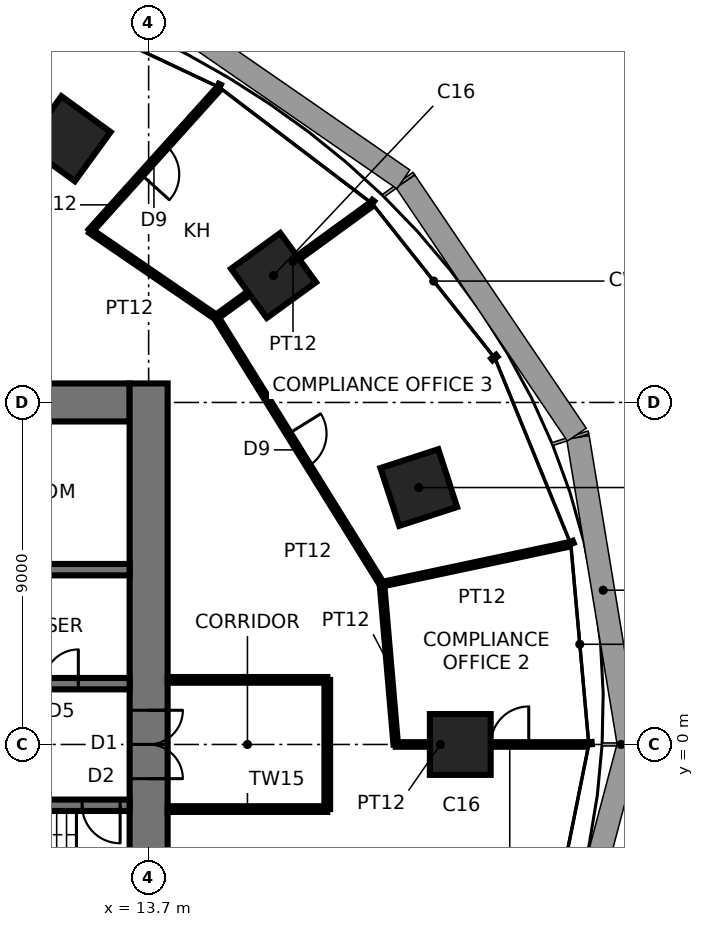
"""IFC4 building model, lengths in metres.
Left out: names, types, materials, properties, quantities, classifications, styles, units other than length and angle.
Written with IfcOpenShell. Run it as: python <this file> out.ifc"""

import sys

from ifc_helpers import new_model, si_unit, direction, frame, frame_2d, origin, origin_2d, place, context, subcontext, project, spatial, rectangle, extrude, element, fill, save


model = new_model("IFC4")
c1 = context("Model", 3, precision=1e-05, world=origin(), true_north=direction((0.0, 1.0)))
c2 = subcontext(c1, "Body", "Model", "MODEL_VIEW")
j1 = project(units=[si_unit("LENGTHUNIT", "METRE"), si_unit("PLANEANGLEUNIT", "RADIAN")], contexts=[c1])
p1 = place(None, origin())
s1 = spatial("IfcSite", under=j1, at=p1, CompositionType="ELEMENT")
p2 = place(p1, origin())
s2 = spatial("IfcBuilding", under=s1, at=p2, CompositionType="ELEMENT")
p3 = place(p2, frame((0.0, 0.0, 96.3)))
s3 = spatial("IfcBuildingStorey", under=s2, at=p3, CompositionType="ELEMENT", Elevation=96.3)
for number, where, z_axis, x_axis in (
    (1, (21.9, 0.0, 0.0), (0.0, 0.0, 1.0), (1.0, 0.0, 0.0)),
    (2, (20.808, 6.761, 0.0), (0.0, 0.0, 1.0), (0.951, 0.309, 0.0)),
    (3, (16.986, 12.341, 0.0), (0.0, 0.0, 1.0), (0.809, 0.588, 0.0)),
    (4, (11.581, 15.94, 0.0), (0.0, 0.0, 1.0), (0.588, 0.809, 0.0)),
):
    element("IfcColumn", number, at=place(p3, frame(where, z_axis=z_axis, x_axis=x_axis)), inside=s3, PredefinedType="COLUMN", context=c2, shape_type="SweptSolid", body=[
        extrude(rectangle(XDim=1.6, YDim=1.6, at=origin_2d()), origin(), (0.0, 0.0, 1.0), 3.9),
    ])
p4 = place(p3, frame((13.2, 9.0, 0.0), z_axis=(0.0, 0.0, 1.0), x_axis=(-1.0, 0.0, 0.0)))
e5 = element("IfcWall", 5, at=p4, inside=s3, PredefinedType="SHEAR", context=c2, shape_type="SweptSolid", body=[
    extrude(rectangle(XDim=26.4, YDim=1.0, at=frame_2d((13.2, 0.0))), origin(), (0.0, 0.0, 1.0), 3.9),
])
p5 = place(p4, frame((2.65, 0.0, 0.0)))
e6 = element("IfcOpeningElement", 6, at=p5, cuts=e5, PredefinedType="OPENING", context=c2, shape_type="SweptSolid", body=[
    extrude(rectangle(XDim=0.9, YDim=2.1, at=frame_2d((0.45, 1.05))), frame((0.0, 0.51, 0.0), z_axis=(0.0, -1.0, 0.0), x_axis=(1.0, 0.0, 0.0)), (0.0, 0.0, 1.0), 1.02),
])
p6 = place(p4, frame((9.5, 0.0, 0.0)))
e7 = element("IfcOpeningElement", 7, at=p6, cuts=e5, PredefinedType="OPENING", context=c2, shape_type="SweptSolid", body=[
    extrude(rectangle(XDim=0.9, YDim=2.1, at=frame_2d((0.45, 1.05))), frame((0.0, 0.51, 0.0), z_axis=(0.0, -1.0, 0.0), x_axis=(1.0, 0.0, 0.0)), (0.0, 0.0, 1.0), 1.02),
])
p7 = place(p4, frame((16.0, 0.0, 0.0)))
e8 = element("IfcOpeningElement", 8, at=p7, cuts=e5, PredefinedType="OPENING", context=c2, shape_type="SweptSolid", body=[
    extrude(rectangle(XDim=0.9, YDim=2.1, at=frame_2d((0.45, 1.05))), frame((0.0, 0.51, 0.0), z_axis=(0.0, -1.0, 0.0), x_axis=(1.0, 0.0, 0.0)), (0.0, 0.0, 1.0), 1.02),
])
p8 = place(p4, frame((21.25, 0.0, 0.0)))
e9 = element("IfcOpeningElement", 9, at=p8, cuts=e5, PredefinedType="OPENING", context=c2, shape_type="SweptSolid", body=[
    extrude(rectangle(XDim=0.9, YDim=2.1, at=frame_2d((0.45, 1.05))), frame((0.0, 0.51, 0.0), z_axis=(0.0, -1.0, 0.0), x_axis=(1.0, 0.0, 0.0)), (0.0, 0.0, 1.0), 1.02),
])
p9 = place(p4, frame((24.8, 0.0, 0.0)))
e10 = element("IfcOpeningElement", 10, at=p9, cuts=e5, PredefinedType="OPENING", context=c2, shape_type="SweptSolid", body=[
    extrude(rectangle(XDim=1.0, YDim=2.1, at=frame_2d((0.5, 1.05))), frame((0.0, 0.51, 0.0), z_axis=(0.0, -1.0, 0.0), x_axis=(1.0, 0.0, 0.0)), (0.0, 0.0, 1.0), 1.02),
])
p10 = place(p3, frame((13.7, -9.5, 0.0), z_axis=(0.0, 0.0, 1.0), x_axis=(0.0, 1.0, 0.0)))
e11 = element("IfcWall", 11, at=p10, inside=s3, PredefinedType="SHEAR", context=c2, shape_type="SweptSolid", body=[
    extrude(rectangle(XDim=19.0, YDim=1.0, at=frame_2d((9.5, 0.0))), origin(), (0.0, 0.0, 1.0), 3.9),
])
p11 = place(p10, frame((8.6, 0.0, 0.0)))
e12 = element("IfcOpeningElement", 12, at=p11, cuts=e11, PredefinedType="OPENING", context=c2, shape_type="SweptSolid", body=[
    extrude(rectangle(XDim=1.8, YDim=2.4, at=frame_2d((0.9, 1.2))), frame((0.0, 0.51, 0.0), z_axis=(0.0, -1.0, 0.0), x_axis=(1.0, 0.0, 0.0)), (0.0, 0.0, 1.0), 1.02),
])
p12 = place(p3, frame((-13.2, 1.6, 0.0), z_axis=(0.0, 0.0, 1.0), x_axis=(1.0, 0.0, 0.0)))
e13 = element("IfcWall", 13, at=p12, inside=s3, PredefinedType="SHEAR", context=c2, shape_type="SweptSolid", body=[
    extrude(rectangle(XDim=26.4, YDim=0.3, at=frame_2d((13.2, 0.0))), origin(), (0.0, 0.0, 1.0), 3.9),
])
p13 = place(p12, frame((0.25, 0.0, 0.0)))
e14 = element("IfcOpeningElement", 14, at=p13, cuts=e13, PredefinedType="OPENING", context=c2, shape_type="SweptSolid", body=[
    extrude(rectangle(XDim=1.0, YDim=2.1, at=frame_2d((0.5, 1.05))), frame((0.0, 0.16, 0.0), z_axis=(0.0, -1.0, 0.0), x_axis=(1.0, 0.0, 0.0)), (0.0, 0.0, 1.0), 0.32),
])
p14 = place(p12, frame((20.25, 0.0, 0.0)))
e15 = element("IfcOpeningElement", 15, at=p14, cuts=e13, PredefinedType="OPENING", context=c2, shape_type="SweptSolid", body=[
    extrude(rectangle(XDim=1.5, YDim=2.4, at=frame_2d((0.75, 1.2))), frame((0.0, 0.16, 0.0), z_axis=(0.0, -1.0, 0.0), x_axis=(1.0, 0.0, 0.0)), (0.0, 0.0, 1.0), 0.32),
])
p15 = place(p12, frame((7.55, 0.0, 0.0)))
e16 = element("IfcOpeningElement", 16, at=p15, cuts=e13, PredefinedType="OPENING", context=c2, shape_type="SweptSolid", body=[
    extrude(rectangle(XDim=0.9, YDim=2.1, at=frame_2d((0.45, 1.05))), frame((0.0, 0.16, 0.0), z_axis=(0.0, -1.0, 0.0), x_axis=(1.0, 0.0, 0.0)), (0.0, 0.0, 1.0), 0.32),
])
p16 = place(p12, frame((10.15, 0.0, 0.0)))
e17 = element("IfcOpeningElement", 17, at=p16, cuts=e13, PredefinedType="OPENING", context=c2, shape_type="SweptSolid", body=[
    extrude(rectangle(XDim=0.9, YDim=2.1, at=frame_2d((0.45, 1.05))), frame((0.0, 0.16, 0.0), z_axis=(0.0, -1.0, 0.0), x_axis=(1.0, 0.0, 0.0)), (0.0, 0.0, 1.0), 0.32),
])
p17 = place(p12, frame((12.75, 0.0, 0.0)))
e18 = element("IfcOpeningElement", 18, at=p17, cuts=e13, PredefinedType="OPENING", context=c2, shape_type="SweptSolid", body=[
    extrude(rectangle(XDim=0.9, YDim=2.1, at=frame_2d((0.45, 1.05))), frame((0.0, 0.16, 0.0), z_axis=(0.0, -1.0, 0.0), x_axis=(1.0, 0.0, 0.0)), (0.0, 0.0, 1.0), 0.32),
])
p18 = place(p12, frame((24.15, 0.0, 0.0)))
e19 = element("IfcOpeningElement", 19, at=p18, cuts=e13, PredefinedType="OPENING", context=c2, shape_type="SweptSolid", body=[
    extrude(rectangle(XDim=0.9, YDim=2.1, at=frame_2d((0.45, 1.05))), frame((0.0, 0.16, 0.0), z_axis=(0.0, -1.0, 0.0), x_axis=(1.0, 0.0, 0.0)), (0.0, 0.0, 1.0), 0.32),
])
p19 = place(p3, frame((-13.2, -1.6, 0.0), z_axis=(0.0, 0.0, 1.0), x_axis=(1.0, 0.0, 0.0)))
e20 = element("IfcWall", 20, at=p19, inside=s3, PredefinedType="SHEAR", context=c2, shape_type="SweptSolid", body=[
    extrude(rectangle(XDim=26.4, YDim=0.3, at=frame_2d((13.2, 0.0))), origin(), (0.0, 0.0, 1.0), 3.9),
])
p20 = place(p19, frame((25.15, 0.0, 0.0)))
e21 = element("IfcOpeningElement", 21, at=p20, cuts=e20, PredefinedType="OPENING", context=c2, shape_type="SweptSolid", body=[
    extrude(rectangle(XDim=1.0, YDim=2.1, at=frame_2d((0.5, 1.05))), frame((0.0, 0.16, 0.0), z_axis=(0.0, -1.0, 0.0), x_axis=(1.0, 0.0, 0.0)), (0.0, 0.0, 1.0), 0.32),
])
p21 = place(p19, frame((7.45, 0.0, 0.0)))
e22 = element("IfcOpeningElement", 22, at=p21, cuts=e20, PredefinedType="OPENING", context=c2, shape_type="SweptSolid", body=[
    extrude(rectangle(XDim=1.1, YDim=2.3, at=frame_2d((0.55, 1.15))), frame((0.0, 0.16, 0.0), z_axis=(0.0, -1.0, 0.0), x_axis=(1.0, 0.0, 0.0)), (0.0, 0.0, 1.0), 0.32),
])
p22 = place(p19, frame((10.05, 0.0, 0.0)))
e23 = element("IfcOpeningElement", 23, at=p22, cuts=e20, PredefinedType="OPENING", context=c2, shape_type="SweptSolid", body=[
    extrude(rectangle(XDim=1.1, YDim=2.3, at=frame_2d((0.55, 1.15))), frame((0.0, 0.16, 0.0), z_axis=(0.0, -1.0, 0.0), x_axis=(1.0, 0.0, 0.0)), (0.0, 0.0, 1.0), 0.32),
])
p23 = place(p19, frame((12.65, 0.0, 0.0)))
e24 = element("IfcOpeningElement", 24, at=p23, cuts=e20, PredefinedType="OPENING", context=c2, shape_type="SweptSolid", body=[
    extrude(rectangle(XDim=1.1, YDim=2.3, at=frame_2d((0.55, 1.15))), frame((0.0, 0.16, 0.0), z_axis=(0.0, -1.0, 0.0), x_axis=(1.0, 0.0, 0.0)), (0.0, 0.0, 1.0), 0.32),
])
p24 = place(p19, frame((15.25, 0.0, 0.0)))
e25 = element("IfcOpeningElement", 25, at=p24, cuts=e20, PredefinedType="OPENING", context=c2, shape_type="SweptSolid", body=[
    extrude(rectangle(XDim=1.1, YDim=2.3, at=frame_2d((0.55, 1.15))), frame((0.0, 0.16, 0.0), z_axis=(0.0, -1.0, 0.0), x_axis=(1.0, 0.0, 0.0)), (0.0, 0.0, 1.0), 0.32),
])
p25 = place(p19, frame((17.85, 0.0, 0.0)))
e26 = element("IfcOpeningElement", 26, at=p25, cuts=e20, PredefinedType="OPENING", context=c2, shape_type="SweptSolid", body=[
    extrude(rectangle(XDim=1.1, YDim=2.3, at=frame_2d((0.55, 1.15))), frame((0.0, 0.16, 0.0), z_axis=(0.0, -1.0, 0.0), x_axis=(1.0, 0.0, 0.0)), (0.0, 0.0, 1.0), 0.32),
])
p26 = place(p19, frame((5.55, 0.0, 0.0)))
e27 = element("IfcOpeningElement", 27, at=p26, cuts=e20, PredefinedType="OPENING", context=c2, shape_type="SweptSolid", body=[
    extrude(rectangle(XDim=0.9, YDim=2.1, at=frame_2d((0.45, 1.05))), frame((0.0, 0.16, 0.0), z_axis=(0.0, -1.0, 0.0), x_axis=(1.0, 0.0, 0.0)), (0.0, 0.0, 1.0), 0.32),
])
p27 = place(p3, frame((-13.2, 4.6, 0.0), z_axis=(0.0, 0.0, 1.0), x_axis=(1.0, 0.0, 0.0)))
e28 = element("IfcWall", 28, at=p27, inside=s3, PredefinedType="SHEAR", context=c2, shape_type="SweptSolid", body=[
    extrude(rectangle(XDim=26.4, YDim=0.3, at=frame_2d((13.2, 0.0))), origin(), (0.0, 0.0, 1.0), 3.9),
])
p28 = place(p3, frame((14.2, -1.7, 0.0), z_axis=(0.0, 0.0, 1.0), x_axis=(1.0, 0.0, 0.0)))
e29 = element("IfcWall", 29, at=p28, inside=s3, PredefinedType="PARTITIONING", context=c2, shape_type="SweptSolid", body=[
    extrude(rectangle(XDim=4.2, YDim=0.15, at=frame_2d((2.1, 0.0))), origin(), (0.0, 0.0, 1.0), 3.74),
])
p29 = place(p3, frame((18.4, -1.7, 0.0), z_axis=(0.0, 0.0, 1.0), x_axis=(0.0, 1.0, 0.0)))
e30 = element("IfcWall", 30, at=p29, inside=s3, PredefinedType="PARTITIONING", context=c2, shape_type="SweptSolid", body=[
    extrude(rectangle(XDim=3.4, YDim=0.15, at=frame_2d((1.7, 0.0))), origin(), (0.0, 0.0, 1.0), 3.74),
])
p30 = place(p3, frame((20.202, 0.0, 0.0), z_axis=(0.0, 0.0, 1.0), x_axis=(1.0, 0.0, 0.0)))
e31 = element("IfcWall", 31, at=p30, inside=s3, PredefinedType="PARTITIONING", context=c2, shape_type="SweptSolid", body=[
    extrude(rectangle(XDim=5.0, YDim=0.12, at=frame_2d((2.5, 0.0))), origin(), (0.0, 0.0, 1.0), 2.94),
])
p31 = place(p30, frame((2.5, 0.0, 0.0)))
e32 = element("IfcOpeningElement", 32, at=p31, cuts=e31, PredefinedType="OPENING", context=c2, shape_type="SweptSolid", body=[
    extrude(rectangle(XDim=1.0, YDim=2.4, at=frame_2d((0.5, 1.2))), frame((0.0, 0.07, 0.0), z_axis=(0.0, -1.0, 0.0), x_axis=(1.0, 0.0, 0.0)), (0.0, 0.0, 1.0), 0.14),
])
p32 = place(p3, frame((18.4, 1.7, 0.0), z_axis=(0.0, 0.0, 1.0), x_axis=(-1.0, 0.0, 0.0)))
e33 = element("IfcWall", 33, at=p32, inside=s3, PredefinedType="PARTITIONING", context=c2, shape_type="SweptSolid", body=[
    extrude(rectangle(XDim=4.2, YDim=0.15, at=frame_2d((2.1, 0.0))), origin(), (0.0, 0.0, 1.0), 3.74),
])
p33 = place(p3, frame((19.84, 4.217, 0.0), z_axis=(0.0, 0.0, 1.0), x_axis=(0.085599097882, -0.996329661529, 0.0)))
e34 = element("IfcWall", 34, at=p33, inside=s3, PredefinedType="PARTITIONING", context=c2, shape_type="SweptSolid", body=[
    extrude(rectangle(XDim=4.233, YDim=0.12, at=frame_2d((2.116, 0.0))), origin(), (0.0, 0.0, 1.0), 3.74),
])
p34 = place(p3, frame((19.84, 4.217, 0.0), z_axis=(0.0, 0.0, 1.0), x_axis=(0.978149046495, 0.207904888932, 0.0)))
e35 = element("IfcWall", 35, at=p34, inside=s3, PredefinedType="PARTITIONING", context=c2, shape_type="SweptSolid", body=[
    extrude(rectangle(XDim=5.0, YDim=0.12, at=frame_2d((2.5, 0.0))), origin(), (0.0, 0.0, 1.0), 3.74),
])
p35 = place(p3, frame((15.477, 11.244, 0.0), z_axis=(0.0, 0.0, 1.0), x_axis=(0.527470861315, -0.849573122494, 0.0)))
e36 = element("IfcWall", 36, at=p35, inside=s3, PredefinedType="PARTITIONING", context=c2, shape_type="SweptSolid", body=[
    extrude(rectangle(XDim=8.272, YDim=0.12, at=frame_2d((4.136, 0.0))), origin(), (0.0, 0.0, 1.0), 3.286),
])
p36 = place(p35, frame((3.611, 0.0, 0.0)))
e37 = element("IfcOpeningElement", 37, at=p36, cuts=e36, PredefinedType="OPENING", context=c2, shape_type="SweptSolid", body=[
    extrude(rectangle(XDim=1.0, YDim=2.4, at=frame_2d((0.5, 1.2))), frame((0.0, 0.07, 0.0), z_axis=(0.0, -1.0, 0.0), x_axis=(1.0, 0.0, 0.0)), (0.0, 0.0, 1.0), 0.14),
])
p37 = place(p3, frame((19.521, 14.183, 0.0), z_axis=(0.0, 0.0, 1.0), x_axis=(-0.809025274756, -0.587773855157, 0.0)))
e38 = element("IfcWall", 38, at=p37, inside=s3, PredefinedType="PARTITIONING", context=c2, shape_type="SweptSolid", body=[
    extrude(rectangle(XDim=5.0, YDim=0.12, at=frame_2d((2.5, 0.0))), origin(), (0.0, 0.0, 1.0), 2.94),
])
p38 = place(p3, frame((12.167, 13.512, 0.0), z_axis=(0.0, 0.0, 1.0), x_axis=(0.824905575903, -0.565270546591, 0.0)))
e39 = element("IfcWall", 39, at=p38, inside=s3, PredefinedType="PARTITIONING", context=c2, shape_type="SweptSolid", body=[
    extrude(rectangle(XDim=4.012, YDim=0.12, at=frame_2d((2.006, 0.0))), origin(), (0.0, 0.0, 1.0), 3.286),
])
p39 = place(p3, frame((15.512, 17.228, 0.0), z_axis=(0.0, 0.0, 1.0), x_axis=(-0.669126573551, -0.743148456614, 0.0)))
e40 = element("IfcWall", 40, at=p39, inside=s3, PredefinedType="PARTITIONING", context=c2, shape_type="SweptSolid", body=[
    extrude(rectangle(XDim=5.0, YDim=0.12, at=frame_2d((2.5, 0.0))), origin(), (0.0, 0.0, 1.0), 3.74),
])
p40 = place(p39, frame((2.0, 0.0, 0.0)))
e41 = element("IfcOpeningElement", 41, at=p40, cuts=e40, PredefinedType="OPENING", context=c2, shape_type="SweptSolid", body=[
    extrude(rectangle(XDim=1.0, YDim=2.4, at=frame_2d((0.5, 1.2))), frame((0.0, 0.07, 0.0), z_axis=(0.0, -1.0, 0.0), x_axis=(1.0, 0.0, 0.0)), (0.0, 0.0, 1.0), 0.14),
])
p41 = place(p11, frame((1.8, 0.0, 0.0), z_axis=(0.0, 0.0, 1.0), x_axis=(-1.0, 0.0, 0.0)))
e42 = element("IfcDoor", 42, at=p41, inside=s3, OperationType="DOUBLE_DOOR_SINGLE_SWING", PredefinedType="DOOR", context=c2, shape_type="SweptSolid", body=[
    extrude(rectangle(XDim=1.72, YDim=2.36, at=frame_2d((0.9, 1.18))), frame((0.0, 0.025, 0.0), z_axis=(0.0, -1.0, 0.0), x_axis=(1.0, 0.0, 0.0)), (0.0, 0.0, 1.0), 0.05),
    extrude(rectangle(XDim=0.04, YDim=2.4, at=frame_2d((1.78, 1.2))), frame((0.0, 0.25, 0.0), z_axis=(0.0, -1.0, 0.0), x_axis=(1.0, 0.0, 0.0)), (0.0, 0.0, 1.0), 0.5),
    extrude(rectangle(XDim=0.04, YDim=2.4, at=frame_2d((0.02, 1.2))), frame((0.0, 0.25, 0.0), z_axis=(0.0, -1.0, 0.0), x_axis=(1.0, 0.0, 0.0)), (0.0, 0.0, 1.0), 0.5),
    extrude(rectangle(XDim=1.72, YDim=0.04, at=frame_2d((0.9, 2.38))), frame((0.0, 0.25, 0.0), z_axis=(0.0, -1.0, 0.0), x_axis=(1.0, 0.0, 0.0)), (0.0, 0.0, 1.0), 0.5),
])
fill(e12, e42)
p42 = place(p20, frame((1.0, 0.0, 0.0), z_axis=(0.0, 0.0, 1.0), x_axis=(-1.0, 0.0, 0.0)))
e43 = element("IfcDoor", 43, at=p42, inside=s3, OperationType="SINGLE_SWING_LEFT", PredefinedType="DOOR", context=c2, shape_type="SweptSolid", body=[
    extrude(rectangle(XDim=1.0, YDim=2.1, at=frame_2d((0.5, 1.05))), frame((0.0, 0.025, 0.0), z_axis=(0.0, -1.0, 0.0), x_axis=(1.0, 0.0, 0.0)), (0.0, 0.0, 1.0), 0.05),
])
fill(e21, e43)
p43 = place(p18, origin())
e44 = element("IfcDoor", 44, at=p43, inside=s3, OperationType="SINGLE_SWING_RIGHT", PredefinedType="DOOR", context=c2, shape_type="SweptSolid", body=[
    extrude(rectangle(XDim=0.9, YDim=2.1, at=frame_2d((0.45, 1.05))), frame((0.0, 0.025, 0.0), z_axis=(0.0, -1.0, 0.0), x_axis=(1.0, 0.0, 0.0)), (0.0, 0.0, 1.0), 0.05),
])
fill(e19, e44)
p44 = place(p40, origin())
e45 = element("IfcDoor", 45, at=p44, inside=s3, OperationType="SINGLE_SWING_RIGHT", PredefinedType="DOOR", context=c2, shape_type="SweptSolid", body=[
    extrude(rectangle(XDim=1.0, YDim=2.4, at=frame_2d((0.5, 1.2))), frame((0.0, 0.025, 0.0), z_axis=(0.0, -1.0, 0.0), x_axis=(1.0, 0.0, 0.0)), (0.0, 0.0, 1.0), 0.05),
])
fill(e41, e45)
p45 = place(p31, origin())
e46 = element("IfcDoor", 46, at=p45, inside=s3, OperationType="SINGLE_SWING_RIGHT", PredefinedType="DOOR", context=c2, shape_type="SweptSolid", body=[
    extrude(rectangle(XDim=1.0, YDim=2.4, at=frame_2d((0.5, 1.2))), frame((0.0, 0.025, 0.0), z_axis=(0.0, -1.0, 0.0), x_axis=(1.0, 0.0, 0.0)), (0.0, 0.0, 1.0), 0.05),
])
fill(e32, e46)
p46 = place(p36, origin())
e47 = element("IfcDoor", 47, at=p46, inside=s3, OperationType="SINGLE_SWING_LEFT", PredefinedType="DOOR", context=c2, shape_type="SweptSolid", body=[
    extrude(rectangle(XDim=1.0, YDim=2.4, at=frame_2d((0.5, 1.2))), frame((0.0, 0.025, 0.0), z_axis=(0.0, -1.0, 0.0), x_axis=(1.0, 0.0, 0.0)), (0.0, 0.0, 1.0), 0.05),
])
fill(e37, e47)
save(model, sys.argv[1])
